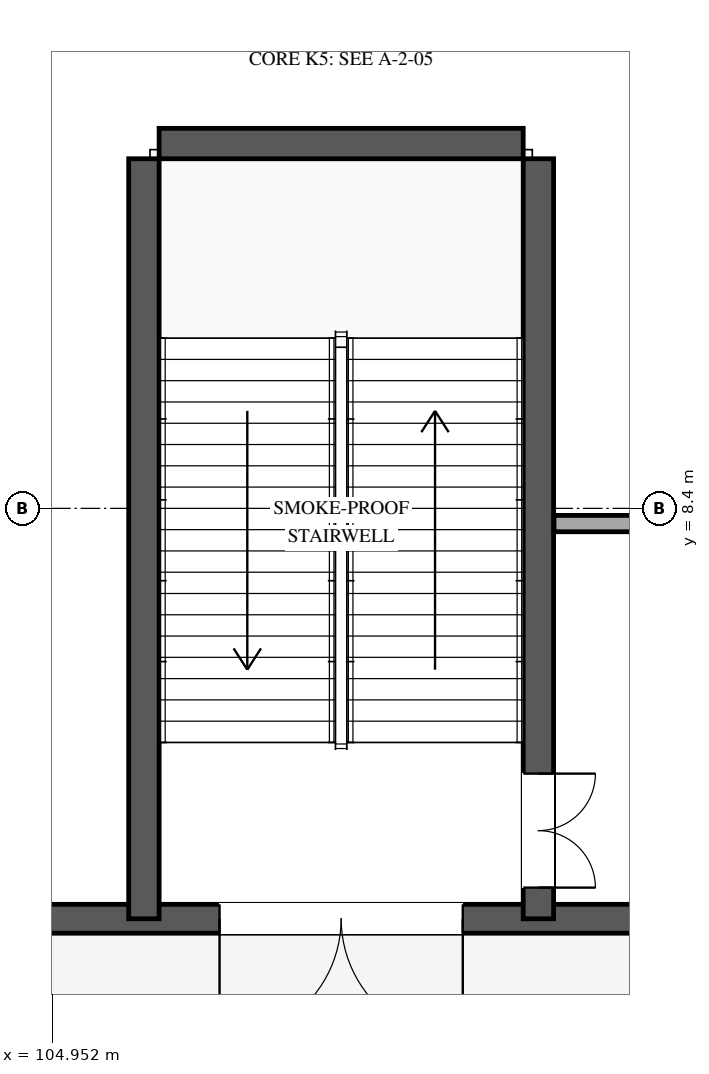
"""IFC4 building model, lengths in metres.
Left out: names, types, materials, properties, quantities, classifications, styles, units other than length and angle.
Written with IfcOpenShell. Run it as: python <this file> out.ifc"""

import sys

from ifc_helpers import new_model, si_unit, direction, frame, frame_2d, origin, place, context, subcontext, project, spatial, rectangle, extrude, element, fill, save


model = new_model("IFC4")
c1 = context("Model", 3, precision=1e-05, world=origin(), true_north=direction((0.0, 1.0)))
c2 = subcontext(c1, "Body", "Model", "MODEL_VIEW")
j1 = project(units=[si_unit("LENGTHUNIT", "METRE"), si_unit("PLANEANGLEUNIT", "RADIAN")], contexts=[c1])
p1 = place(None, origin())
s1 = spatial("IfcSite", under=j1, at=p1, CompositionType="ELEMENT")
p2 = place(p1, origin())
s2 = spatial("IfcBuilding", under=s1, at=p2, CompositionType="ELEMENT")
p3 = place(p2, origin())
s3 = spatial("IfcBuildingStorey", under=s2, at=p3, CompositionType="ELEMENT", Elevation=0.0)
p4 = place(p3, frame((113.098, 3.0, 0.0), z_axis=(0.0, 0.0, 1.0), x_axis=(-1.0, 0.0, 0.0)))
e1 = element("IfcWall", 1, at=p4, inside=s3, PredefinedType="STANDARD", context=c2, shape_type="SweptSolid", body=[
    extrude(rectangle(XDim=8.698, YDim=0.38, at=frame_2d((4.349, 0.0))), origin(), (0.0, 0.0, 1.0), 5.66),
])
p5 = place(p4, frame((2.748, 0.0, 0.0)))
e2 = element("IfcOpeningElement", 2, at=p5, cuts=e1, PredefinedType="OPENING", context=c2, shape_type="SweptSolid", body=[
    extrude(rectangle(XDim=3.2, YDim=2.4, at=frame_2d((1.6, 1.2))), frame((0.0, 0.2, 0.0), z_axis=(0.0, -1.0, 0.0), x_axis=(1.0, 0.0, 0.0)), (0.0, 0.0, 1.0), 0.4),
])
p6 = place(p3, frame((106.155, 3.0, 0.0), z_axis=(0.0, 0.0, 1.0), x_axis=(0.0, 1.0, 0.0)))
e3 = element("IfcWall", 3, at=p6, inside=s3, PredefinedType="SHEAR", context=c2, shape_type="SweptSolid", body=[
    extrude(rectangle(XDim=10.0, YDim=0.4, at=frame_2d((5.0, 0.0))), origin(), (0.0, 0.0, 1.0), 6.0),
])
p7 = place(p3, frame((111.345, 13.0, 0.0), z_axis=(0.0, 0.0, 1.0), x_axis=(0.0, -1.0, 0.0)))
e4 = element("IfcWall", 4, at=p7, inside=s3, PredefinedType="SHEAR", context=c2, shape_type="SweptSolid", body=[
    extrude(rectangle(XDim=10.0, YDim=0.4, at=frame_2d((5.0, 0.0))), origin(), (0.0, 0.0, 1.0), 6.0),
])
p8 = place(p7, frame((8.09, 0.0, 0.0)))
e5 = element("IfcOpeningElement", 5, at=p8, cuts=e4, PredefinedType="OPENING", context=c2, shape_type="SweptSolid", body=[
    extrude(rectangle(XDim=1.5, YDim=2.2, at=frame_2d((0.75, 1.1))), frame((0.0, 0.21, 0.0), z_axis=(0.0, -1.0, 0.0), x_axis=(1.0, 0.0, 0.0)), (0.0, 0.0, 1.0), 0.42),
])
p9 = place(p3, frame((106.355, 13.2, 0.0), z_axis=(0.0, 0.0, 1.0), x_axis=(1.0, 0.0, 0.0)))
e6 = element("IfcWall", 6, at=p9, inside=s3, PredefinedType="SHEAR", context=c2, shape_type="SweptSolid", body=[
    extrude(rectangle(XDim=4.79, YDim=0.4, at=frame_2d((2.395, 0.0))), origin(), (0.0, 0.0, 1.0), 6.0),
])
p10 = place(p3, frame((111.55, 8.2, 0.0), z_axis=(0.0, 0.0, 1.0), x_axis=(1.0, 0.0, 0.0)))
e7 = element("IfcWall", 7, at=p10, inside=s3, PredefinedType="PARTITIONING", context=c2, shape_type="SweptSolid", body=[
    extrude(rectangle(XDim=1.09, YDim=0.215, at=frame_2d((0.545, 0.0))), origin(), (0.0, 0.0, 1.0), 5.66),
])
p11 = place(p5, origin())
e8 = element("IfcDoor", 8, at=p11, inside=s3, OperationType="DOUBLE_DOOR_SINGLE_SWING", PredefinedType="USERDEFINED", context=c2, shape_type="SweptSolid", body=[
    extrude(rectangle(XDim=3.2, YDim=2.4, at=frame_2d((1.6, 1.2))), frame((0.0, 0.025, 0.0), z_axis=(0.0, -1.0, 0.0), x_axis=(1.0, 0.0, 0.0)), (0.0, 0.0, 1.0), 0.05),
])
fill(e2, e8)
p12 = place(p8, origin())
e9 = element("IfcDoor", 9, at=p12, inside=s3, OperationType="DOUBLE_DOOR_SINGLE_SWING", PredefinedType="DOOR", context=c2, shape_type="SweptSolid", body=[
    extrude(rectangle(XDim=1.5, YDim=2.2, at=frame_2d((0.75, 1.1))), frame((0.0, 0.025, 0.0), z_axis=(0.0, -1.0, 0.0), x_axis=(1.0, 0.0, 0.0)), (0.0, 0.0, 1.0), 0.05),
])
fill(e5, e9)
save(model, sys.argv[1])
